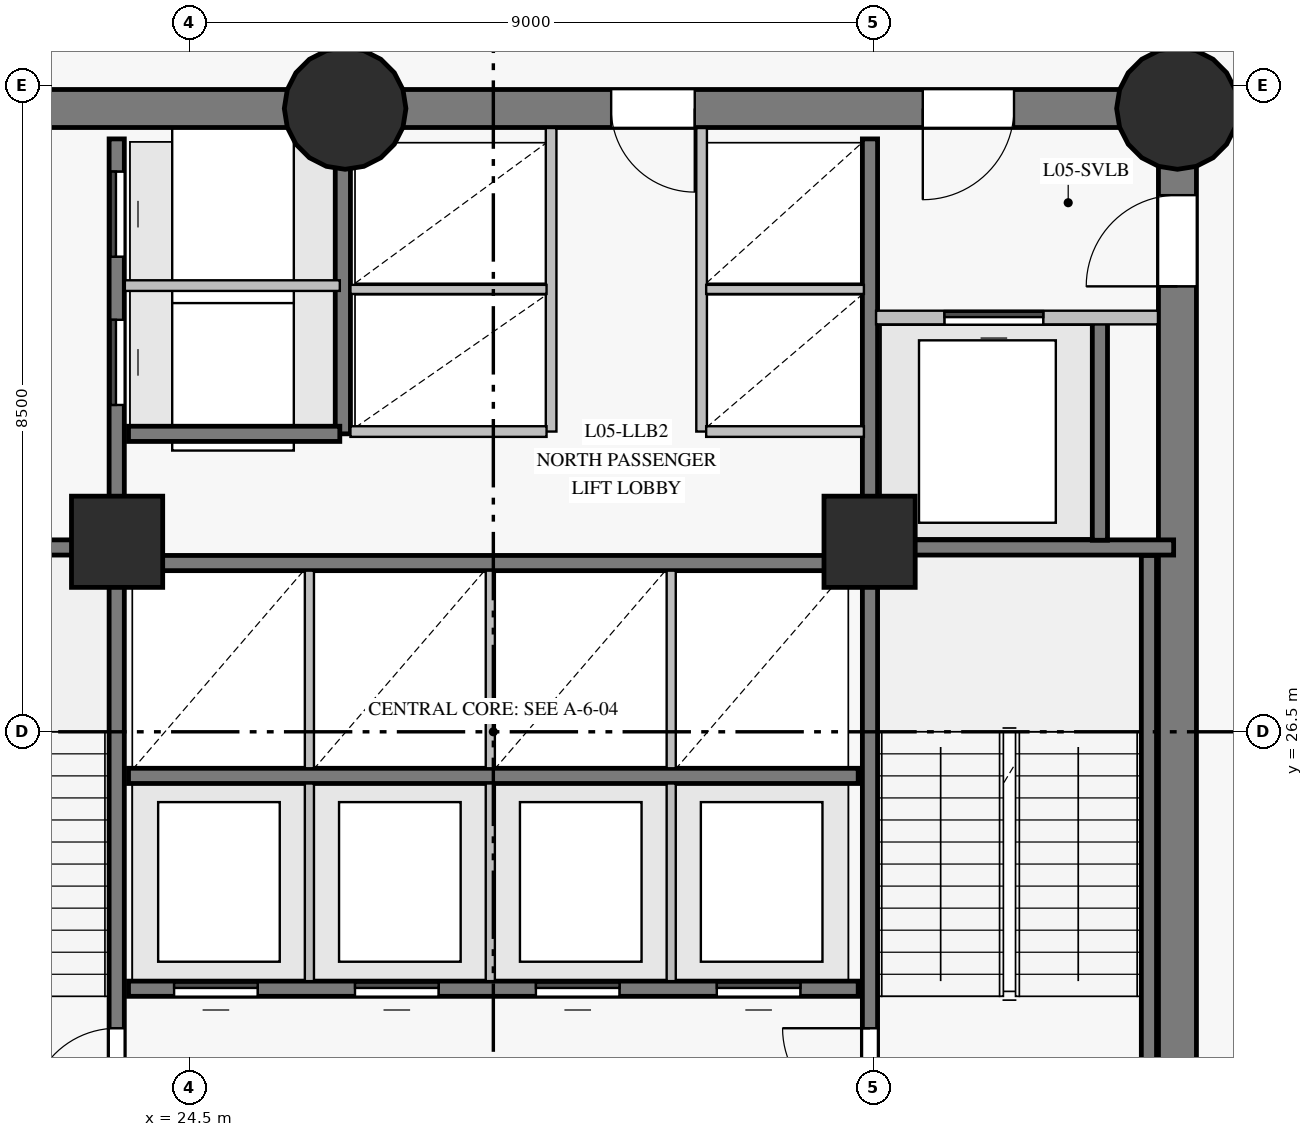
"""IFC4 building model, lengths in metres.
Left out: names, types, materials, properties, quantities, classifications, styles, units other than length and angle.
Written with IfcOpenShell. Run it as: python <this file> out.ifc"""

import sys

from ifc_helpers import new_model, si_unit, direction, frame, frame_2d, origin, origin_with_axes, origin_2d, place, context, subcontext, project, spatial, rectangle, circle, extrude, source, transform, mapped, element, fill, save


model = new_model("IFC4")
c1 = context("Model", 3, precision=1e-05, world=origin(), true_north=direction((0.0, 1.0)))
c2 = subcontext(c1, "Body", "Model", "MODEL_VIEW")
j1 = project(units=[si_unit("LENGTHUNIT", "METRE"), si_unit("PLANEANGLEUNIT", "RADIAN")], contexts=[c1])
p1 = place(None, origin())
s1 = spatial("IfcSite", under=j1, at=p1, CompositionType="ELEMENT")
p2 = place(p1, origin())
s2 = spatial("IfcBuilding", under=s1, at=p2, CompositionType="ELEMENT")
p3 = place(p2, frame((0.0, 0.0, 22.5)))
s3 = spatial("IfcBuildingStorey", under=s2, at=p3, CompositionType="ELEMENT", Elevation=22.5)
p4 = place(p3, frame((37.5, 18.3, 0.0), z_axis=(0.0, 0.0, 1.0), x_axis=(0.0, 1.0, 0.0)))
e1 = element("IfcWall", 1, at=p4, inside=s3, PredefinedType="SHEAR", context=c2, shape_type="SweptSolid", body=[
    extrude(rectangle(XDim=16.4, YDim=0.5, at=frame_2d((8.2, 0.0))), origin(), (0.0, 0.0, 1.0), 3.75),
])
p5 = place(p4, frame((14.06, 0.0, 0.0)))
e2 = element("IfcOpeningElement", 2, at=p5, cuts=e1, PredefinedType="OPENING", context=c2, shape_type="SweptSolid", body=[
    extrude(rectangle(XDim=1.2, YDim=2.15, at=frame_2d((0.6, 1.075))), frame((0.0, 0.26, 0.0), z_axis=(0.0, -1.0, 0.0), x_axis=(1.0, 0.0, 0.0)), (0.0, 0.0, 1.0), 0.52),
])
p6 = place(p3, frame((37.5, 34.7, 0.0), z_axis=(0.0, 0.0, 1.0), x_axis=(-1.0, 0.0, 0.0)))
e3 = element("IfcWall", 3, at=p6, inside=s3, PredefinedType="SHEAR", context=c2, shape_type="SweptSolid", body=[
    extrude(rectangle(XDim=10.95, YDim=0.5, at=frame_2d((5.475, 0.0))), origin(), (0.0, 0.0, 1.0), 3.75),
])
p7 = place(p6, frame((2.15, 0.0, 0.0)))
e4 = element("IfcOpeningElement", 4, at=p7, cuts=e3, PredefinedType="OPENING", context=c2, shape_type="SweptSolid", body=[
    extrude(rectangle(XDim=1.2, YDim=2.15, at=frame_2d((0.6, 1.075))), frame((0.0, 0.26, 0.0), z_axis=(0.0, -1.0, 0.0), x_axis=(1.0, 0.0, 0.0)), (0.0, 0.0, 1.0), 0.52),
])
p8 = place(p6, frame((6.35, 0.0, 0.0)))
e5 = element("IfcOpeningElement", 5, at=p8, cuts=e3, PredefinedType="OPENING", context=c2, shape_type="SweptSolid", body=[
    extrude(rectangle(XDim=1.1, YDim=2.15, at=frame_2d((0.55, 1.075))), frame((0.0, 0.26, 0.0), z_axis=(0.0, -1.0, 0.0), x_axis=(1.0, 0.0, 0.0)), (0.0, 0.0, 1.0), 0.52),
])
p9 = place(p3, frame((26.55, 34.7, 0.0), z_axis=(0.0, 0.0, 1.0), x_axis=(-1.0, 0.0, 0.0)))
e6 = element("IfcWall", 6, at=p9, inside=s3, PredefinedType="SHEAR", context=c2, shape_type="SweptSolid", body=[
    extrude(rectangle(XDim=7.05, YDim=0.5, at=frame_2d((3.525, 0.0))), origin(), (0.0, 0.0, 1.0), 3.75),
])
p10 = place(p9, frame((4.25, 0.0, 0.0)))
e7 = element("IfcOpeningElement", 7, at=p10, cuts=e6, PredefinedType="OPENING", context=c2, shape_type="SweptSolid", body=[
    extrude(rectangle(XDim=1.1, YDim=2.15, at=frame_2d((0.55, 1.075))), frame((0.0, 0.26, 0.0), z_axis=(0.0, -1.0, 0.0), x_axis=(1.0, 0.0, 0.0)), (0.0, 0.0, 1.0), 0.52),
])
m1 = source(origin_with_axes(), c2, "Body", "SweptSolid", [
    extrude(circle(Radius=0.8, at=origin_2d()), origin(), (0.0, 0.0, 1.0), 4.0),
])
for number, where, z_axis, x_axis in (
    (8, (26.55, 34.7, 0.0), (0.0, 0.0, 1.0), (1.0, 0.0, 0.0)),
    (9, (37.5, 34.7, 0.0), (0.0, 0.0, 1.0), (1.0, 0.0, 0.0)),
):
    element("IfcColumn", number, at=place(p3, frame(where, z_axis=z_axis, x_axis=x_axis)), inside=s3, PredefinedType="COLUMN", context=c2, shape_type="MappedRepresentation", body=[
        mapped(m1, transform((0.0, 0.0, 0.0), scale=1.0)),
    ])
m2 = source(origin_with_axes(), c2, "Body", "SweptSolid", [
    extrude(rectangle(XDim=1.2, YDim=1.2, at=origin_2d()), origin(), (0.0, 0.0, 1.0), 4.0),
])
for number, where, z_axis, x_axis in (
    (10, (23.55, 29.0, 0.0), (0.0, 0.0, 1.0), (1.0, 0.0, 0.0)),
    (11, (33.45, 29.0, 0.0), (0.0, 0.0, 1.0), (1.0, 0.0, 0.0)),
):
    element("IfcColumn", number, at=place(p3, frame(where, z_axis=z_axis, x_axis=x_axis)), inside=s3, PredefinedType="COLUMN", context=c2, shape_type="MappedRepresentation", body=[
        mapped(m2, transform((0.0, 0.0, 0.0), scale=1.0)),
    ])
p11 = place(p3, frame((23.545, 18.7, 0.0), z_axis=(0.0, 0.0, 1.0), x_axis=(0.0, 1.0, 0.0)))
e12 = element("IfcWall", 12, at=p11, inside=s3, PredefinedType="SHEAR", context=c2, shape_type="SweptSolid", body=[
    extrude(rectangle(XDim=15.6, YDim=0.2, at=frame_2d((7.8, 0.0))), origin(), (0.0, 0.0, 1.0), 3.75),
])
p12 = place(p11, frame((2.75, 0.0, 0.0)))
e13 = element("IfcOpeningElement", 13, at=p12, cuts=e12, PredefinedType="OPENING", context=c2, shape_type="SweptSolid", body=[
    extrude(rectangle(XDim=1.15, YDim=2.15, at=frame_2d((0.575, 1.075))), frame((0.0, 0.11, 0.0), z_axis=(0.0, -1.0, 0.0), x_axis=(1.0, 0.0, 0.0)), (0.0, 0.0, 1.0), 0.22),
])
p13 = place(p11, frame((0.14, 0.0, 0.0)))
e14 = element("IfcOpeningElement", 14, at=p13, cuts=e12, PredefinedType="OPENING", context=c2, shape_type="SweptSolid", body=[
    extrude(rectangle(XDim=0.88, YDim=2.1, at=frame_2d((0.44, 1.05))), frame((0.0, 0.11, 0.0), z_axis=(0.0, -1.0, 0.0), x_axis=(1.0, 0.0, 0.0)), (0.0, 0.0, 1.0), 0.22),
])
p14 = place(p11, frame((1.36, 0.0, 0.0)))
e15 = element("IfcOpeningElement", 15, at=p14, cuts=e12, PredefinedType="OPENING", context=c2, shape_type="SweptSolid", body=[
    extrude(rectangle(XDim=0.88, YDim=2.1, at=frame_2d((0.44, 1.05))), frame((0.0, 0.11, 0.0), z_axis=(0.0, -1.0, 0.0), x_axis=(1.0, 0.0, 0.0)), (0.0, 0.0, 1.0), 0.22),
])
p15 = place(p11, frame((12.1, 0.0, 0.0)))
e16 = element("IfcOpeningElement", 16, at=p15, cuts=e12, PredefinedType="OPENING", context=c2, shape_type="SweptSolid", body=[
    extrude(rectangle(XDim=1.12, YDim=2.15, at=frame_2d((0.56, 1.075))), frame((0.0, 0.11, 0.0), z_axis=(0.0, -1.0, 0.0), x_axis=(1.0, 0.0, 0.0)), (0.0, 0.0, 1.0), 0.22),
])
p16 = place(p11, frame((14.05, 0.0, 0.0)))
e17 = element("IfcOpeningElement", 17, at=p16, cuts=e12, PredefinedType="OPENING", context=c2, shape_type="SweptSolid", body=[
    extrude(rectangle(XDim=1.12, YDim=2.15, at=frame_2d((0.56, 1.075))), frame((0.0, 0.11, 0.0), z_axis=(0.0, -1.0, 0.0), x_axis=(1.0, 0.0, 0.0)), (0.0, 0.0, 1.0), 0.22),
])
p17 = place(p3, frame((33.455, 18.7, 0.0), z_axis=(0.0, 0.0, 1.0), x_axis=(0.0, 1.0, 0.0)))
e18 = element("IfcWall", 18, at=p17, inside=s3, PredefinedType="SHEAR", context=c2, shape_type="SweptSolid", body=[
    extrude(rectangle(XDim=15.6, YDim=0.2, at=frame_2d((7.8, 0.0))), origin(), (0.0, 0.0, 1.0), 3.75),
])
p18 = place(p17, frame((2.75, 0.0, 0.0)))
e19 = element("IfcOpeningElement", 19, at=p18, cuts=e18, PredefinedType="OPENING", context=c2, shape_type="SweptSolid", body=[
    extrude(rectangle(XDim=1.15, YDim=2.15, at=frame_2d((0.575, 1.075))), frame((0.0, 0.11, 0.0), z_axis=(0.0, -1.0, 0.0), x_axis=(1.0, 0.0, 0.0)), (0.0, 0.0, 1.0), 0.22),
])
p19 = place(p17, frame((0.55, 0.0, 0.0)))
e20 = element("IfcOpeningElement", 20, at=p19, cuts=e18, PredefinedType="OPENING", context=c2, shape_type="SweptSolid", body=[
    extrude(rectangle(XDim=0.94, YDim=2.1, at=frame_2d((0.47, 1.05))), frame((0.0, 0.11, 0.0), z_axis=(0.0, -1.0, 0.0), x_axis=(1.0, 0.0, 0.0)), (0.0, 0.0, 1.0), 0.22),
])
p20 = place(p3, frame((23.7, 23.12, 0.0), z_axis=(0.0, 0.0, 1.0), x_axis=(1.0, 0.0, 0.0)))
e21 = element("IfcWall", 21, at=p20, inside=s3, PredefinedType="SHEAR", context=c2, shape_type="SweptSolid", body=[
    extrude(rectangle(XDim=9.6, YDim=0.2, at=frame_2d((4.8, 0.0))), origin(), (0.0, 0.0, 1.0), 3.75),
])
p21 = place(p20, frame((0.6, 0.0, 0.0)))
e22 = element("IfcOpeningElement", 22, at=p21, cuts=e21, PredefinedType="OPENING", context=c2, shape_type="SweptSolid", body=[
    extrude(rectangle(XDim=1.1, YDim=2.15, at=frame_2d((0.55, 1.075))), frame((0.0, 0.11, 0.0), z_axis=(0.0, -1.0, 0.0), x_axis=(1.0, 0.0, 0.0)), (0.0, 0.0, 1.0), 0.22),
])
p22 = place(p20, frame((2.98, 0.0, 0.0)))
e23 = element("IfcOpeningElement", 23, at=p22, cuts=e21, PredefinedType="OPENING", context=c2, shape_type="SweptSolid", body=[
    extrude(rectangle(XDim=1.1, YDim=2.15, at=frame_2d((0.55, 1.075))), frame((0.0, 0.11, 0.0), z_axis=(0.0, -1.0, 0.0), x_axis=(1.0, 0.0, 0.0)), (0.0, 0.0, 1.0), 0.22),
])
p23 = place(p20, frame((5.36, 0.0, 0.0)))
e24 = element("IfcOpeningElement", 24, at=p23, cuts=e21, PredefinedType="OPENING", context=c2, shape_type="SweptSolid", body=[
    extrude(rectangle(XDim=1.1, YDim=2.15, at=frame_2d((0.55, 1.075))), frame((0.0, 0.11, 0.0), z_axis=(0.0, -1.0, 0.0), x_axis=(1.0, 0.0, 0.0)), (0.0, 0.0, 1.0), 0.22),
])
p24 = place(p20, frame((7.74, 0.0, 0.0)))
e25 = element("IfcOpeningElement", 25, at=p24, cuts=e21, PredefinedType="OPENING", context=c2, shape_type="SweptSolid", body=[
    extrude(rectangle(XDim=1.1, YDim=2.15, at=frame_2d((0.55, 1.075))), frame((0.0, 0.11, 0.0), z_axis=(0.0, -1.0, 0.0), x_axis=(1.0, 0.0, 0.0)), (0.0, 0.0, 1.0), 0.22),
])
for number, where, z_axis, x_axis in (
    (26, (23.7, 25.92, 0.0), (0.0, 0.0, 1.0), (1.0, 0.0, 0.0)),
    (27, (23.7, 28.72, 0.0), (0.0, 0.0, 1.0), (1.0, 0.0, 0.0)),
):
    element("IfcWall", number, at=place(p3, frame(where, z_axis=z_axis, x_axis=x_axis)), inside=s3, PredefinedType="SHEAR", context=c2, shape_type="SweptSolid", body=[
        extrude(rectangle(XDim=9.6, YDim=0.2, at=frame_2d((4.8, 0.0))), origin(), (0.0, 0.0, 1.0), 3.75),
    ])
p25 = place(p3, frame((37.125, 21.32, 0.0), z_axis=(0.0, 0.0, 1.0), x_axis=(0.0, 1.0, 0.0)))
e28 = element("IfcWall", 28, at=p25, inside=s3, PredefinedType="SHEAR", context=c2, shape_type="SweptSolid", body=[
    extrude(rectangle(XDim=7.5, YDim=0.2, at=frame_2d((3.75, 0.0))), origin(), (0.0, 0.0, 1.0), 3.75),
])
for number, where, z_axis, x_axis in (
    (29, (33.455, 28.925, 0.0), (0.0, 0.0, 1.0), (1.0, 0.0, 0.0)),
    (30, (19.55, 28.925, 0.0), (0.0, 0.0, 1.0), (1.0, 0.0, 0.0)),
):
    element("IfcWall", number, at=place(p3, frame(where, z_axis=z_axis, x_axis=x_axis)), inside=s3, PredefinedType="SHEAR", context=c2, shape_type="SweptSolid", body=[
        extrude(rectangle(XDim=3.995, YDim=0.2, at=frame_2d((1.998, 0.0))), origin(), (0.0, 0.0, 1.0), 3.75),
    ])
p26 = place(p3, frame((26.52, 30.42, 0.0), z_axis=(0.0, 0.0, 1.0), x_axis=(0.0, 1.0, 0.0)))
e31 = element("IfcWall", 31, at=p26, inside=s3, PredefinedType="SHEAR", context=c2, shape_type="SweptSolid", body=[
    extrude(rectangle(XDim=3.86, YDim=0.2, at=frame_2d((1.93, 0.0))), origin(), (0.0, 0.0, 1.0), 3.75),
])
p27 = place(p3, frame((36.48, 29.02, 0.0), z_axis=(0.0, 0.0, 1.0), x_axis=(0.0, 1.0, 0.0)))
e32 = element("IfcWall", 32, at=p27, inside=s3, PredefinedType="SHEAR", context=c2, shape_type="SweptSolid", body=[
    extrude(rectangle(XDim=2.86, YDim=0.2, at=frame_2d((1.43, 0.0))), origin(), (0.0, 0.0, 1.0), 3.75),
])
p28 = place(p3, frame((23.7, 30.42, 0.0), z_axis=(0.0, 0.0, 1.0), x_axis=(1.0, 0.0, 0.0)))
e33 = element("IfcWall", 33, at=p28, inside=s3, PredefinedType="SHEAR", context=c2, shape_type="SweptSolid", body=[
    extrude(rectangle(XDim=2.78, YDim=0.2, at=frame_2d((1.39, 0.0))), origin(), (0.0, 0.0, 1.0), 3.75),
])
for number, where, z_axis, x_axis in (
    (34, (29.26, 30.45, 0.0), (0.0, 0.0, 1.0), (0.0, 1.0, 0.0)),
    (35, (31.24, 30.45, 0.0), (0.0, 0.0, 1.0), (0.0, 1.0, 0.0)),
):
    element("IfcWall", number, at=place(p3, frame(where, z_axis=z_axis, x_axis=x_axis)), inside=s3, PredefinedType="PARTITIONING", context=c2, shape_type="SweptSolid", body=[
        extrude(rectangle(XDim=3.993, YDim=0.14, at=frame_2d((1.997, 0.0))), origin(), (0.0, 0.0, 1.0), 3.75),
    ])
p29 = place(p3, frame((33.535, 31.95, 0.0), z_axis=(0.0, 0.0, 1.0), x_axis=(1.0, 0.0, 0.0)))
e36 = element("IfcWall", 36, at=p29, inside=s3, PredefinedType="PARTITIONING", context=c2, shape_type="SweptSolid", body=[
    extrude(rectangle(XDim=3.709, YDim=0.18, at=frame_2d((1.854, 0.0))), origin(), (0.0, 0.0, 1.0), 3.75),
])
p30 = place(p29, frame((0.9, 0.0, 0.0)))
e37 = element("IfcOpeningElement", 37, at=p30, cuts=e36, PredefinedType="OPENING", context=c2, shape_type="SweptSolid", body=[
    extrude(rectangle(XDim=1.3, YDim=2.2, at=frame_2d((0.65, 1.1))), frame((0.0, 0.1, 0.0), z_axis=(0.0, -1.0, 0.0), x_axis=(1.0, 0.0, 0.0)), (0.0, 0.0, 1.0), 0.2),
])
p31 = place(p3, frame((23.652, 32.37, 0.0), z_axis=(0.0, 0.0, 1.0), x_axis=(1.0, 0.0, 0.0)))
e38 = element("IfcWall", 38, at=p31, inside=s3, PredefinedType="PARTITIONING", context=c2, shape_type="SweptSolid", body=[
    extrude(rectangle(XDim=2.828, YDim=0.14, at=frame_2d((1.414, 0.0))), origin(), (0.0, 0.0, 1.0), 3.75),
])
for number, where, z_axis, x_axis in (
    (39, (26.08, 23.22, 0.0), (0.0, 0.0, 1.0), (0.0, 1.0, 0.0)),
    (40, (28.46, 23.22, 0.0), (0.0, 0.0, 1.0), (0.0, 1.0, 0.0)),
    (41, (30.84, 23.22, 0.0), (0.0, 0.0, 1.0), (0.0, 1.0, 0.0)),
    (42, (26.08, 26.02, 0.0), (0.0, 0.0, 1.0), (0.0, 1.0, 0.0)),
    (43, (28.46, 26.02, 0.0), (0.0, 0.0, 1.0), (0.0, 1.0, 0.0)),
    (44, (30.84, 26.02, 0.0), (0.0, 0.0, 1.0), (0.0, 1.0, 0.0)),
):
    element("IfcWall", number, at=place(p3, frame(where, z_axis=z_axis, x_axis=x_axis)), inside=s3, PredefinedType="PARTITIONING", context=c2, shape_type="SweptSolid", body=[
        extrude(rectangle(XDim=2.6, YDim=0.12, at=frame_2d((1.3, 0.0))), origin(), (0.0, 0.0, 1.0), 3.75),
    ])
p32 = place(p3, frame((26.62, 30.45, 0.0), z_axis=(0.0, 0.0, 1.0), x_axis=(1.0, 0.0, 0.0)))
e45 = element("IfcWall", 45, at=p32, inside=s3, PredefinedType="PARTITIONING", context=c2, shape_type="SweptSolid", body=[
    extrude(rectangle(XDim=2.58, YDim=0.14, at=frame_2d((1.29, 0.0))), origin(), (0.0, 0.0, 1.0), 3.75),
])
p33 = place(p3, frame((26.62, 32.32, 0.0), z_axis=(0.0, 0.0, 1.0), x_axis=(1.0, 0.0, 0.0)))
e46 = element("IfcWall", 46, at=p33, inside=s3, PredefinedType="PARTITIONING", context=c2, shape_type="SweptSolid", body=[
    extrude(rectangle(XDim=2.58, YDim=0.12, at=frame_2d((1.29, 0.0))), origin(), (0.0, 0.0, 1.0), 3.75),
])
p34 = place(p3, frame((31.3, 30.45, 0.0), z_axis=(0.0, 0.0, 1.0), x_axis=(1.0, 0.0, 0.0)))
e47 = element("IfcWall", 47, at=p34, inside=s3, PredefinedType="PARTITIONING", context=c2, shape_type="SweptSolid", body=[
    extrude(rectangle(XDim=2.075, YDim=0.14, at=frame_2d((1.038, 0.0))), origin(), (0.0, 0.0, 1.0), 3.75),
])
p35 = place(p3, frame((31.3, 32.32, 0.0), z_axis=(0.0, 0.0, 1.0), x_axis=(1.0, 0.0, 0.0)))
e48 = element("IfcWall", 48, at=p35, inside=s3, PredefinedType="PARTITIONING", context=c2, shape_type="SweptSolid", body=[
    extrude(rectangle(XDim=2.075, YDim=0.12, at=frame_2d((1.038, 0.0))), origin(), (0.0, 0.0, 1.0), 3.75),
])
m3 = source(origin_with_axes(), c2, "Body", "SweptSolid", [
    extrude(rectangle(XDim=1.15, YDim=2.15, at=frame_2d((0.575, 1.075))), frame((0.0, 0.025, 0.0), z_axis=(0.0, -1.0, 0.0), x_axis=(1.0, 0.0, 0.0)), (0.0, 0.0, 1.0), 0.05),
])
p36 = place(p12, origin())
e49 = element("IfcDoor", 49, at=p36, inside=s3, OperationType="SINGLE_SWING_LEFT", PredefinedType="DOOR", context=c2, shape_type="MappedRepresentation", body=[
    mapped(m3, transform((0.0, 0.0, 0.0), scale=1.0)),
])
fill(e13, e49)
p37 = place(p18, origin())
e50 = element("IfcDoor", 50, at=p37, inside=s3, OperationType="SINGLE_SWING_RIGHT", PredefinedType="DOOR", context=c2, shape_type="MappedRepresentation", body=[
    mapped(m3, transform((0.0, 0.0, 0.0), scale=1.0)),
])
fill(e19, e50)
m4 = source(origin_with_axes(), c2, "Body", "SweptSolid", [
    extrude(rectangle(XDim=1.2, YDim=2.15, at=frame_2d((0.6, 1.075))), frame((0.0, 0.025, 0.0), z_axis=(0.0, -1.0, 0.0), x_axis=(1.0, 0.0, 0.0)), (0.0, 0.0, 1.0), 0.05),
])
p38 = place(p5, origin())
e51 = element("IfcDoor", 51, at=p38, inside=s3, OperationType="SINGLE_SWING_LEFT", PredefinedType="DOOR", context=c2, shape_type="MappedRepresentation", body=[
    mapped(m4, transform((0.0, 0.0, 0.0), scale=1.0)),
])
fill(e2, e51)
p39 = place(p7, origin())
e52 = element("IfcDoor", 52, at=p39, inside=s3, OperationType="SINGLE_SWING_RIGHT", PredefinedType="DOOR", context=c2, shape_type="MappedRepresentation", body=[
    mapped(m4, transform((0.0, 0.0, 0.0), scale=1.0)),
])
fill(e4, e52)
m5 = source(origin_with_axes(), c2, "Body", "SweptSolid", [
    extrude(rectangle(XDim=1.3, YDim=2.2, at=frame_2d((0.65, 1.1))), frame((0.0, 0.025, 0.0), z_axis=(0.0, -1.0, 0.0), x_axis=(1.0, 0.0, 0.0)), (0.0, 0.0, 1.0), 0.05),
])
p40 = place(p30, origin())
e53 = element("IfcDoor", 53, at=p40, inside=s3, OperationType="SLIDING_TO_LEFT", PredefinedType="DOOR", context=c2, shape_type="MappedRepresentation", body=[
    mapped(m5, transform((0.0, 0.0, 0.0), scale=1.0)),
])
fill(e37, e53)
m6 = source(origin_with_axes(), c2, "Body", "SweptSolid", [
    extrude(rectangle(XDim=1.1, YDim=2.15, at=frame_2d((0.55, 1.075))), frame((0.0, 0.025, 0.0), z_axis=(0.0, -1.0, 0.0), x_axis=(1.0, 0.0, 0.0)), (0.0, 0.0, 1.0), 0.05),
])
p41 = place(p21, origin())
e54 = element("IfcDoor", 54, at=p41, inside=s3, OperationType="SLIDING_TO_LEFT", PredefinedType="DOOR", context=c2, shape_type="MappedRepresentation", body=[
    mapped(m6, transform((0.0, 0.0, 0.0), scale=1.0)),
])
fill(e22, e54)
p42 = place(p22, origin())
e55 = element("IfcDoor", 55, at=p42, inside=s3, OperationType="SLIDING_TO_RIGHT", PredefinedType="DOOR", context=c2, shape_type="MappedRepresentation", body=[
    mapped(m6, transform((0.0, 0.0, 0.0), scale=1.0)),
])
fill(e23, e55)
p43 = place(p23, origin())
e56 = element("IfcDoor", 56, at=p43, inside=s3, OperationType="SLIDING_TO_LEFT", PredefinedType="DOOR", context=c2, shape_type="MappedRepresentation", body=[
    mapped(m6, transform((0.0, 0.0, 0.0), scale=1.0)),
])
fill(e24, e56)
p44 = place(p24, origin())
e57 = element("IfcDoor", 57, at=p44, inside=s3, OperationType="SLIDING_TO_RIGHT", PredefinedType="DOOR", context=c2, shape_type="MappedRepresentation", body=[
    mapped(m6, transform((0.0, 0.0, 0.0), scale=1.0)),
])
fill(e25, e57)
p45 = place(p8, origin())
e58 = element("IfcDoor", 58, at=p45, inside=s3, OperationType="SINGLE_SWING_LEFT", PredefinedType="DOOR", context=c2, shape_type="MappedRepresentation", body=[
    mapped(m6, transform((0.0, 0.0, 0.0), scale=1.0)),
])
fill(e5, e58)
m7 = source(origin_with_axes(), c2, "Body", "SweptSolid", [
    extrude(rectangle(XDim=1.12, YDim=2.15, at=frame_2d((0.56, 1.075))), frame((0.0, 0.025, 0.0), z_axis=(0.0, -1.0, 0.0), x_axis=(1.0, 0.0, 0.0)), (0.0, 0.0, 1.0), 0.05),
])
p46 = place(p15, origin())
e59 = element("IfcDoor", 59, at=p46, inside=s3, OperationType="SLIDING_TO_LEFT", PredefinedType="DOOR", context=c2, shape_type="MappedRepresentation", body=[
    mapped(m7, transform((0.0, 0.0, 0.0), scale=1.0)),
])
fill(e16, e59)
p47 = place(p16, origin())
e60 = element("IfcDoor", 60, at=p47, inside=s3, OperationType="SLIDING_TO_RIGHT", PredefinedType="DOOR", context=c2, shape_type="MappedRepresentation", body=[
    mapped(m7, transform((0.0, 0.0, 0.0), scale=1.0)),
])
fill(e17, e60)
save(model, sys.argv[1])
